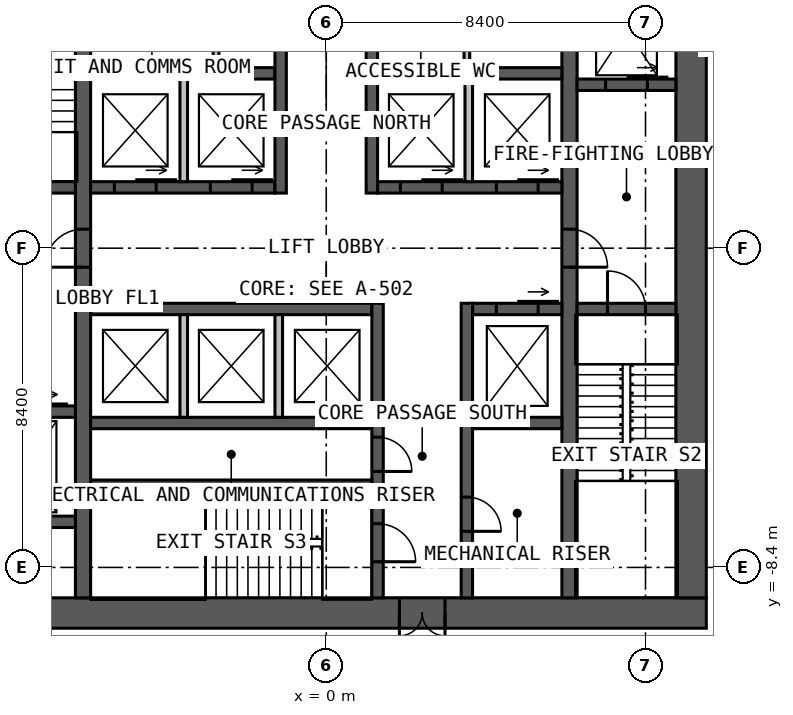
"""IFC4 building model, lengths in metres.
Left out: names, types, materials, properties, quantities, classifications, styles, units other than length and angle.
Written with IfcOpenShell. Run it as: python <this file> out.ifc"""

import sys

from ifc_helpers import new_model, si_unit, direction, frame, frame_2d, origin, place, context, subcontext, project, spatial, rectangle, extrude, element, fill, save


model = new_model("IFC4")
c1 = context("Model", 3, precision=1e-05, world=origin(), true_north=direction((0.0, 1.0)))
c2 = subcontext(c1, "Body", "Model", "MODEL_VIEW")
j1 = project(units=[si_unit("LENGTHUNIT", "METRE"), si_unit("PLANEANGLEUNIT", "RADIAN")], contexts=[c1])
p1 = place(None, origin())
s1 = spatial("IfcSite", under=j1, at=p1, CompositionType="ELEMENT")
p2 = place(p1, origin())
s2 = spatial("IfcBuilding", under=s1, at=p2, CompositionType="ELEMENT")
p3 = place(p2, frame((0.0, 0.0, 45.0)))
s3 = spatial("IfcBuildingStorey", under=s2, at=p3, CompositionType="ELEMENT", Elevation=45.0)
p4 = place(p3, frame((10.0, -9.6, 0.0), z_axis=(0.0, 0.0, 1.0), x_axis=(-1.0, 0.0, 0.0)))
e1 = element("IfcWall", 1, at=p4, inside=s3, PredefinedType="SOLIDWALL", context=c2, shape_type="SweptSolid", body=[
    extrude(rectangle(XDim=20.0, YDim=0.8, at=frame_2d((10.0, 0.0))), origin(), (0.0, 0.0, 1.0), 4.0),
])
p5 = place(p4, frame((6.875, 0.0, 0.0)))
e2 = element("IfcOpeningElement", 2, at=p5, cuts=e1, PredefinedType="OPENING", context=c2, shape_type="SweptSolid", body=[
    extrude(rectangle(XDim=1.2, YDim=2.2, at=frame_2d((0.6, 1.1))), frame((0.0, 0.41, 0.0), z_axis=(0.0, -1.0, 0.0), x_axis=(1.0, 0.0, 0.0)), (0.0, 0.0, 1.0), 0.82),
])
p6 = place(p3, frame((9.6, -9.2, 0.0), z_axis=(0.0, 0.0, 1.0), x_axis=(0.0, 1.0, 0.0)))
e3 = element("IfcWall", 3, at=p6, inside=s3, PredefinedType="SOLIDWALL", context=c2, shape_type="SweptSolid", body=[
    extrude(rectangle(XDim=18.4, YDim=0.8, at=frame_2d((9.2, 0.0))), origin(), (0.0, 0.0, 1.0), 4.0),
])
p7 = place(p3, frame((-6.4, -9.2, 0.0), z_axis=(0.0, 0.0, 1.0), x_axis=(0.0, 1.0, 0.0)))
e4 = element("IfcWall", 4, at=p7, inside=s3, PredefinedType="SOLIDWALL", context=c2, shape_type="SweptSolid", body=[
    extrude(rectangle(XDim=18.4, YDim=0.4, at=frame_2d((9.2, 0.0))), origin(), (0.0, 0.0, 1.0), 4.0),
])
p8 = place(p7, frame((8.7, 0.0, 0.0)))
e5 = element("IfcOpeningElement", 5, at=p8, cuts=e4, PredefinedType="OPENING", context=c2, shape_type="SweptSolid", body=[
    extrude(rectangle(XDim=1.0, YDim=2.2, at=frame_2d((0.5, 1.1))), frame((0.0, 0.21, 0.0), z_axis=(0.0, -1.0, 0.0), x_axis=(1.0, 0.0, 0.0)), (0.0, 0.0, 1.0), 0.42),
])
p9 = place(p3, frame((6.4, 9.2, 0.0), z_axis=(0.0, 0.0, 1.0), x_axis=(0.0, -1.0, 0.0)))
e6 = element("IfcWall", 6, at=p9, inside=s3, PredefinedType="SOLIDWALL", context=c2, shape_type="SweptSolid", body=[
    extrude(rectangle(XDim=18.4, YDim=0.4, at=frame_2d((9.2, 0.0))), origin(), (0.0, 0.0, 1.0), 4.0),
])
p10 = place(p9, frame((8.7, 0.0, 0.0)))
e7 = element("IfcOpeningElement", 7, at=p10, cuts=e6, PredefinedType="OPENING", context=c2, shape_type="SweptSolid", body=[
    extrude(rectangle(XDim=1.0, YDim=2.2, at=frame_2d((0.5, 1.1))), frame((0.0, 0.21, 0.0), z_axis=(0.0, -1.0, 0.0), x_axis=(1.0, 0.0, 0.0)), (0.0, 0.0, 1.0), 0.42),
])
p11 = place(p3, frame((-6.2, 1.6, 0.0), z_axis=(0.0, 0.0, 1.0), x_axis=(1.0, 0.0, 0.0)))
e8 = element("IfcWall", 8, at=p11, inside=s3, PredefinedType="SOLIDWALL", context=c2, shape_type="SweptSolid", body=[
    extrude(rectangle(XDim=4.85, YDim=0.3, at=frame_2d((2.425, 0.0))), origin(), (0.0, 0.0, 1.0), 4.0),
])
p12 = place(p11, frame((0.625, 0.0, 0.0)))
e9 = element("IfcOpeningElement", 9, at=p12, cuts=e8, PredefinedType="OPENING", context=c2, shape_type="SweptSolid", body=[
    extrude(rectangle(XDim=1.1, YDim=2.2, at=frame_2d((0.55, 1.1))), frame((0.0, 0.16, 0.0), z_axis=(0.0, -1.0, 0.0), x_axis=(1.0, 0.0, 0.0)), (0.0, 0.0, 1.0), 0.32),
])
p13 = place(p11, frame((3.15, 0.0, 0.0)))
e10 = element("IfcOpeningElement", 10, at=p13, cuts=e8, PredefinedType="OPENING", context=c2, shape_type="SweptSolid", body=[
    extrude(rectangle(XDim=1.1, YDim=2.2, at=frame_2d((0.55, 1.1))), frame((0.0, 0.16, 0.0), z_axis=(0.0, -1.0, 0.0), x_axis=(1.0, 0.0, 0.0)), (0.0, 0.0, 1.0), 0.32),
])
p14 = place(p3, frame((1.35, 1.6, 0.0), z_axis=(0.0, 0.0, 1.0), x_axis=(1.0, 0.0, 0.0)))
e11 = element("IfcWall", 11, at=p14, inside=s3, PredefinedType="SOLIDWALL", context=c2, shape_type="SweptSolid", body=[
    extrude(rectangle(XDim=4.85, YDim=0.3, at=frame_2d((2.425, 0.0))), origin(), (0.0, 0.0, 1.0), 4.0),
])
p15 = place(p14, frame((0.6, 0.0, 0.0)))
e12 = element("IfcOpeningElement", 12, at=p15, cuts=e11, PredefinedType="OPENING", context=c2, shape_type="SweptSolid", body=[
    extrude(rectangle(XDim=1.1, YDim=2.2, at=frame_2d((0.55, 1.1))), frame((0.0, 0.16, 0.0), z_axis=(0.0, -1.0, 0.0), x_axis=(1.0, 0.0, 0.0)), (0.0, 0.0, 1.0), 0.32),
])
p16 = place(p14, frame((3.125, 0.0, 0.0)))
e13 = element("IfcOpeningElement", 13, at=p16, cuts=e11, PredefinedType="OPENING", context=c2, shape_type="SweptSolid", body=[
    extrude(rectangle(XDim=1.1, YDim=2.2, at=frame_2d((0.55, 1.1))), frame((0.0, 0.16, 0.0), z_axis=(0.0, -1.0, 0.0), x_axis=(1.0, 0.0, 0.0)), (0.0, 0.0, 1.0), 0.32),
])
for number, where, z_axis, x_axis in (
    (14, (-6.2, 4.6, 0.0), (0.0, 0.0, 1.0), (1.0, 0.0, 0.0)),
    (15, (1.35, 4.6, 0.0), (0.0, 0.0, 1.0), (1.0, 0.0, 0.0)),
):
    element("IfcWall", number, at=place(p3, frame(where, z_axis=z_axis, x_axis=x_axis)), inside=s3, PredefinedType="SOLIDWALL", context=c2, shape_type="SweptSolid", body=[
        extrude(rectangle(XDim=4.85, YDim=0.3, at=frame_2d((2.425, 0.0))), origin(), (0.0, 0.0, 1.0), 4.0),
    ])
p17 = place(p3, frame((-1.2, 1.45, 0.0), z_axis=(0.0, 0.0, 1.0), x_axis=(0.0, 1.0, 0.0)))
e16 = element("IfcWall", 16, at=p17, inside=s3, PredefinedType="SOLIDWALL", context=c2, shape_type="SweptSolid", body=[
    extrude(rectangle(XDim=7.75, YDim=0.3, at=frame_2d((3.875, 0.0))), origin(), (0.0, 0.0, 1.0), 4.0),
])
p18 = place(p17, frame((5.05, 0.0, 0.0)))
e17 = element("IfcOpeningElement", 17, at=p18, cuts=e16, PredefinedType="OPENING", context=c2, shape_type="SweptSolid", body=[
    extrude(rectangle(XDim=1.0, YDim=2.2, at=frame_2d((0.5, 1.1))), frame((0.0, 0.16, 0.0), z_axis=(0.0, -1.0, 0.0), x_axis=(1.0, 0.0, 0.0)), (0.0, 0.0, 1.0), 0.32),
])
p19 = place(p3, frame((1.2, 1.45, 0.0), z_axis=(0.0, 0.0, 1.0), x_axis=(0.0, 1.0, 0.0)))
e18 = element("IfcWall", 18, at=p19, inside=s3, PredefinedType="SOLIDWALL", context=c2, shape_type="SweptSolid", body=[
    extrude(rectangle(XDim=7.75, YDim=0.3, at=frame_2d((3.875, 0.0))), origin(), (0.0, 0.0, 1.0), 4.0),
])
p20 = place(p19, frame((3.8, 0.0, 0.0)))
e19 = element("IfcOpeningElement", 19, at=p20, cuts=e18, PredefinedType="OPENING", context=c2, shape_type="SweptSolid", body=[
    extrude(rectangle(XDim=1.0, YDim=2.2, at=frame_2d((0.5, 1.1))), frame((0.0, 0.16, 0.0), z_axis=(0.0, -1.0, 0.0), x_axis=(1.0, 0.0, 0.0)), (0.0, 0.0, 1.0), 0.32),
])
p21 = place(p19, frame((6.15, 0.0, 0.0)))
e20 = element("IfcOpeningElement", 20, at=p21, cuts=e18, PredefinedType="OPENING", context=c2, shape_type="SweptSolid", body=[
    extrude(rectangle(XDim=1.0, YDim=2.2, at=frame_2d((0.5, 1.1))), frame((0.0, 0.16, 0.0), z_axis=(0.0, -1.0, 0.0), x_axis=(1.0, 0.0, 0.0)), (0.0, 0.0, 1.0), 0.32),
])
p22 = place(p3, frame((-6.2, -1.6, 0.0), z_axis=(0.0, 0.0, 1.0), x_axis=(1.0, 0.0, 0.0)))
e21 = element("IfcWall", 21, at=p22, inside=s3, PredefinedType="SOLIDWALL", context=c2, shape_type="SweptSolid", body=[
    extrude(rectangle(XDim=7.4, YDim=0.3, at=frame_2d((3.7, 0.0))), origin(), (0.0, 0.0, 1.0), 4.0),
])
p23 = place(p3, frame((3.85, -1.6, 0.0), z_axis=(0.0, 0.0, 1.0), x_axis=(1.0, 0.0, 0.0)))
e22 = element("IfcWall", 22, at=p23, inside=s3, PredefinedType="SOLIDWALL", context=c2, shape_type="SweptSolid", body=[
    extrude(rectangle(XDim=2.35, YDim=0.3, at=frame_2d((1.175, 0.0))), origin(), (0.0, 0.0, 1.0), 4.0),
])
p24 = place(p23, frame((0.625, 0.0, 0.0)))
e23 = element("IfcOpeningElement", 23, at=p24, cuts=e22, PredefinedType="OPENING", context=c2, shape_type="SweptSolid", body=[
    extrude(rectangle(XDim=1.1, YDim=2.2, at=frame_2d((0.55, 1.1))), frame((0.0, 0.16, 0.0), z_axis=(0.0, -1.0, 0.0), x_axis=(1.0, 0.0, 0.0)), (0.0, 0.0, 1.0), 0.32),
])
p25 = place(p3, frame((-6.2, -4.6, 0.0), z_axis=(0.0, 0.0, 1.0), x_axis=(1.0, 0.0, 0.0)))
e24 = element("IfcWall", 24, at=p25, inside=s3, PredefinedType="SOLIDWALL", context=c2, shape_type="SweptSolid", body=[
    extrude(rectangle(XDim=7.4, YDim=0.3, at=frame_2d((3.7, 0.0))), origin(), (0.0, 0.0, 1.0), 4.0),
])
p26 = place(p3, frame((3.85, -4.6, 0.0), z_axis=(0.0, 0.0, 1.0), x_axis=(1.0, 0.0, 0.0)))
e25 = element("IfcWall", 25, at=p26, inside=s3, PredefinedType="SOLIDWALL", context=c2, shape_type="SweptSolid", body=[
    extrude(rectangle(XDim=2.35, YDim=0.3, at=frame_2d((1.175, 0.0))), origin(), (0.0, 0.0, 1.0), 4.0),
])
p27 = place(p3, frame((1.35, -1.45, 0.0), z_axis=(0.0, 0.0, 1.0), x_axis=(0.0, -1.0, 0.0)))
e26 = element("IfcWall", 26, at=p27, inside=s3, PredefinedType="SOLIDWALL", context=c2, shape_type="SweptSolid", body=[
    extrude(rectangle(XDim=7.75, YDim=0.3, at=frame_2d((3.875, 0.0))), origin(), (0.0, 0.0, 1.0), 4.0),
])
p28 = place(p27, frame((5.8, 0.0, 0.0)))
e27 = element("IfcOpeningElement", 27, at=p28, cuts=e26, PredefinedType="OPENING", context=c2, shape_type="SweptSolid", body=[
    extrude(rectangle(XDim=1.0, YDim=2.2, at=frame_2d((0.5, 1.1))), frame((0.0, 0.16, 0.0), z_axis=(0.0, -1.0, 0.0), x_axis=(1.0, 0.0, 0.0)), (0.0, 0.0, 1.0), 0.32),
])
p29 = place(p27, frame((3.525, 0.0, 0.0)))
e28 = element("IfcOpeningElement", 28, at=p29, cuts=e26, PredefinedType="OPENING", context=c2, shape_type="SweptSolid", body=[
    extrude(rectangle(XDim=0.9, YDim=2.2, at=frame_2d((0.45, 1.1))), frame((0.0, 0.16, 0.0), z_axis=(0.0, -1.0, 0.0), x_axis=(1.0, 0.0, 0.0)), (0.0, 0.0, 1.0), 0.32),
])
p30 = place(p3, frame((3.7, -1.45, 0.0), z_axis=(0.0, 0.0, 1.0), x_axis=(0.0, -1.0, 0.0)))
e29 = element("IfcWall", 29, at=p30, inside=s3, PredefinedType="SOLIDWALL", context=c2, shape_type="SweptSolid", body=[
    extrude(rectangle(XDim=7.75, YDim=0.3, at=frame_2d((3.875, 0.0))), origin(), (0.0, 0.0, 1.0), 4.0),
])
p31 = place(p30, frame((5.1, 0.0, 0.0)))
e30 = element("IfcOpeningElement", 30, at=p31, cuts=e29, PredefinedType="OPENING", context=c2, shape_type="SweptSolid", body=[
    extrude(rectangle(XDim=0.9, YDim=2.2, at=frame_2d((0.45, 1.1))), frame((0.0, 0.16, 0.0), z_axis=(0.0, -1.0, 0.0), x_axis=(1.0, 0.0, 0.0)), (0.0, 0.0, 1.0), 0.32),
])
p32 = place(p3, frame((-6.2, -6.2, 0.0), z_axis=(0.0, 0.0, 1.0), x_axis=(1.0, 0.0, 0.0)))
e31 = element("IfcWall", 31, at=p32, inside=s3, PredefinedType="SOLIDWALL", context=c2, shape_type="SweptSolid", body=[
    extrude(rectangle(XDim=7.4, YDim=0.2, at=frame_2d((3.7, 0.0))), origin(), (0.0, 0.0, 1.0), 4.0),
])
p33 = place(p3, frame((-9.2, 1.6, 0.0), z_axis=(0.0, 0.0, 1.0), x_axis=(1.0, 0.0, 0.0)))
e32 = element("IfcWall", 32, at=p33, inside=s3, PredefinedType="SOLIDWALL", context=c2, shape_type="SweptSolid", body=[
    extrude(rectangle(XDim=2.6, YDim=0.3, at=frame_2d((1.3, 0.0))), origin(), (0.0, 0.0, 1.0), 4.0),
])
p34 = place(p33, frame((0.8, 0.0, 0.0)))
e33 = element("IfcOpeningElement", 33, at=p34, cuts=e32, PredefinedType="OPENING", context=c2, shape_type="SweptSolid", body=[
    extrude(rectangle(XDim=1.0, YDim=2.2, at=frame_2d((0.5, 1.1))), frame((0.0, 0.16, 0.0), z_axis=(0.0, -1.0, 0.0), x_axis=(1.0, 0.0, 0.0)), (0.0, 0.0, 1.0), 0.32),
])
p35 = place(p3, frame((6.6, -1.6, 0.0), z_axis=(0.0, 0.0, 1.0), x_axis=(1.0, 0.0, 0.0)))
e34 = element("IfcWall", 34, at=p35, inside=s3, PredefinedType="SOLIDWALL", context=c2, shape_type="SweptSolid", body=[
    extrude(rectangle(XDim=2.6, YDim=0.3, at=frame_2d((1.3, 0.0))), origin(), (0.0, 0.0, 1.0), 4.0),
])
p36 = place(p35, frame((0.8, 0.0, 0.0)))
e35 = element("IfcOpeningElement", 35, at=p36, cuts=e34, PredefinedType="OPENING", context=c2, shape_type="SweptSolid", body=[
    extrude(rectangle(XDim=1.0, YDim=2.2, at=frame_2d((0.5, 1.1))), frame((0.0, 0.16, 0.0), z_axis=(0.0, -1.0, 0.0), x_axis=(1.0, 0.0, 0.0)), (0.0, 0.0, 1.0), 0.32),
])
p37 = place(p3, frame((-9.2, -4.3, 0.0), z_axis=(0.0, 0.0, 1.0), x_axis=(1.0, 0.0, 0.0)))
e36 = element("IfcWall", 36, at=p37, inside=s3, PredefinedType="SOLIDWALL", context=c2, shape_type="SweptSolid", body=[
    extrude(rectangle(XDim=2.6, YDim=0.3, at=frame_2d((1.3, 0.0))), origin(), (0.0, 0.0, 1.0), 4.0),
])
p38 = place(p37, frame((0.75, 0.0, 0.0)))
e37 = element("IfcOpeningElement", 37, at=p38, cuts=e36, PredefinedType="OPENING", context=c2, shape_type="SweptSolid", body=[
    extrude(rectangle(XDim=1.1, YDim=2.2, at=frame_2d((0.55, 1.1))), frame((0.0, 0.16, 0.0), z_axis=(0.0, -1.0, 0.0), x_axis=(1.0, 0.0, 0.0)), (0.0, 0.0, 1.0), 0.32),
])
p39 = place(p3, frame((6.6, 4.3, 0.0), z_axis=(0.0, 0.0, 1.0), x_axis=(1.0, 0.0, 0.0)))
e38 = element("IfcWall", 38, at=p39, inside=s3, PredefinedType="SOLIDWALL", context=c2, shape_type="SweptSolid", body=[
    extrude(rectangle(XDim=2.6, YDim=0.3, at=frame_2d((1.3, 0.0))), origin(), (0.0, 0.0, 1.0), 4.0),
])
p40 = place(p39, frame((0.75, 0.0, 0.0)))
e39 = element("IfcOpeningElement", 39, at=p40, cuts=e38, PredefinedType="OPENING", context=c2, shape_type="SweptSolid", body=[
    extrude(rectangle(XDim=1.1, YDim=2.2, at=frame_2d((0.55, 1.1))), frame((0.0, 0.16, 0.0), z_axis=(0.0, -1.0, 0.0), x_axis=(1.0, 0.0, 0.0)), (0.0, 0.0, 1.0), 0.32),
])
p41 = place(p3, frame((-9.2, -7.2, 0.0), z_axis=(0.0, 0.0, 1.0), x_axis=(1.0, 0.0, 0.0)))
e40 = element("IfcWall", 40, at=p41, inside=s3, PredefinedType="SOLIDWALL", context=c2, shape_type="SweptSolid", body=[
    extrude(rectangle(XDim=2.6, YDim=0.3, at=frame_2d((1.3, 0.0))), origin(), (0.0, 0.0, 1.0), 4.0),
])
for number, where, z_axis, x_axis in (
    (41, (-3.75, 1.75, 0.0), (0.0, 0.0, 1.0), (0.0, 1.0, 0.0)),
    (42, (3.75, 1.75, 0.0), (0.0, 0.0, 1.0), (0.0, 1.0, 0.0)),
    (43, (-3.75, -1.75, 0.0), (0.0, 0.0, 1.0), (0.0, -1.0, 0.0)),
    (44, (-1.25, -1.75, 0.0), (0.0, 0.0, 1.0), (0.0, -1.0, 0.0)),
):
    element("IfcWall", number, at=place(p3, frame(where, z_axis=z_axis, x_axis=x_axis)), inside=s3, PredefinedType="SOLIDWALL", context=c2, shape_type="SweptSolid", body=[
        extrude(rectangle(XDim=2.7, YDim=0.2, at=frame_2d((1.35, 0.0))), origin(), (0.0, 0.0, 1.0), 3.75),
    ])
p42 = place(p3, frame((3.7, 4.75, 0.0), z_axis=(0.0, 0.0, 1.0), x_axis=(0.0, 1.0, 0.0)))
e45 = element("IfcWall", 45, at=p42, inside=s3, PredefinedType="PARTITIONING", context=c2, shape_type="SweptSolid", body=[
    extrude(rectangle(XDim=1.975, YDim=0.15, at=frame_2d((0.988, 0.0))), origin(), (0.0, 0.0, 1.0), 3.75),
])
p43 = place(p3, frame((-2.9, 4.75, 0.0), z_axis=(0.0, 0.0, 1.0), x_axis=(0.0, 1.0, 0.0)))
e46 = element("IfcWall", 46, at=p43, inside=s3, PredefinedType="PARTITIONING", context=c2, shape_type="SweptSolid", body=[
    extrude(rectangle(XDim=4.45, YDim=0.15, at=frame_2d((2.225, 0.0))), origin(), (0.0, 0.0, 1.0), 3.75),
])
p44 = place(p43, frame((2.95, 0.0, 0.0)))
e47 = element("IfcOpeningElement", 47, at=p44, cuts=e46, PredefinedType="OPENING", context=c2, shape_type="SweptSolid", body=[
    extrude(rectangle(XDim=1.0, YDim=2.2, at=frame_2d((0.5, 1.1))), frame((0.0, 0.085, 0.0), z_axis=(0.0, -1.0, 0.0), x_axis=(1.0, 0.0, 0.0)), (0.0, 0.0, 1.0), 0.17),
])
p45 = place(p43, frame((0.6, 0.0, 0.0)))
e48 = element("IfcOpeningElement", 48, at=p45, cuts=e46, PredefinedType="OPENING", context=c2, shape_type="SweptSolid", body=[
    extrude(rectangle(XDim=0.9, YDim=2.2, at=frame_2d((0.45, 1.1))), frame((0.0, 0.085, 0.0), z_axis=(0.0, -1.0, 0.0), x_axis=(1.0, 0.0, 0.0)), (0.0, 0.0, 1.0), 0.17),
])
p46 = place(p5, origin())
e49 = element("IfcDoor", 49, at=p46, inside=s3, OperationType="DOUBLE_DOOR_SINGLE_SWING", PredefinedType="DOOR", context=c2, shape_type="SweptSolid", body=[
    extrude(rectangle(XDim=1.2, YDim=2.2, at=frame_2d((0.6, 1.1))), frame((0.0, 0.025, 0.0), z_axis=(0.0, -1.0, 0.0), x_axis=(1.0, 0.0, 0.0)), (0.0, 0.0, 1.0), 0.05),
])
fill(e2, e49)
p47 = place(p8, origin())
e50 = element("IfcDoor", 50, at=p47, inside=s3, OperationType="SINGLE_SWING_LEFT", PredefinedType="DOOR", context=c2, shape_type="SweptSolid", body=[
    extrude(rectangle(XDim=1.0, YDim=2.2, at=frame_2d((0.5, 1.1))), frame((0.0, 0.025, 0.0), z_axis=(0.0, -1.0, 0.0), x_axis=(1.0, 0.0, 0.0)), (0.0, 0.0, 1.0), 0.05),
])
fill(e5, e50)
p48 = place(p10, origin())
e51 = element("IfcDoor", 51, at=p48, inside=s3, OperationType="SINGLE_SWING_RIGHT", PredefinedType="DOOR", context=c2, shape_type="SweptSolid", body=[
    extrude(rectangle(XDim=1.0, YDim=2.2, at=frame_2d((0.5, 1.1))), frame((0.0, 0.025, 0.0), z_axis=(0.0, -1.0, 0.0), x_axis=(1.0, 0.0, 0.0)), (0.0, 0.0, 1.0), 0.05),
])
fill(e7, e51)
p49 = place(p36, origin())
e52 = element("IfcDoor", 52, at=p49, inside=s3, OperationType="SINGLE_SWING_LEFT", PredefinedType="DOOR", context=c2, shape_type="SweptSolid", body=[
    extrude(rectangle(XDim=1.0, YDim=2.2, at=frame_2d((0.5, 1.1))), frame((0.0, 0.025, 0.0), z_axis=(0.0, -1.0, 0.0), x_axis=(1.0, 0.0, 0.0)), (0.0, 0.0, 1.0), 0.05),
])
fill(e35, e52)
p50 = place(p28, origin())
e53 = element("IfcDoor", 53, at=p50, inside=s3, OperationType="SINGLE_SWING_RIGHT", PredefinedType="DOOR", context=c2, shape_type="SweptSolid", body=[
    extrude(rectangle(XDim=1.0, YDim=2.2, at=frame_2d((0.5, 1.1))), frame((0.0, 0.025, 0.0), z_axis=(0.0, -1.0, 0.0), x_axis=(1.0, 0.0, 0.0)), (0.0, 0.0, 1.0), 0.05),
])
fill(e27, e53)
p51 = place(p29, origin())
e54 = element("IfcDoor", 54, at=p51, inside=s3, OperationType="SINGLE_SWING_RIGHT", PredefinedType="DOOR", context=c2, shape_type="SweptSolid", body=[
    extrude(rectangle(XDim=0.9, YDim=2.2, at=frame_2d((0.45, 1.1))), frame((0.0, 0.025, 0.0), z_axis=(0.0, -1.0, 0.0), x_axis=(1.0, 0.0, 0.0)), (0.0, 0.0, 1.0), 0.05),
])
fill(e28, e54)
p52 = place(p31, origin())
e55 = element("IfcDoor", 55, at=p52, inside=s3, OperationType="SINGLE_SWING_RIGHT", PredefinedType="DOOR", context=c2, shape_type="SweptSolid", body=[
    extrude(rectangle(XDim=0.9, YDim=2.2, at=frame_2d((0.45, 1.1))), frame((0.0, 0.025, 0.0), z_axis=(0.0, -1.0, 0.0), x_axis=(1.0, 0.0, 0.0)), (0.0, 0.0, 1.0), 0.05),
])
fill(e30, e55)
p53 = place(p12, origin())
e56 = element("IfcDoor", 56, at=p53, inside=s3, OperationType="SLIDING_TO_LEFT", PredefinedType="DOOR", context=c2, shape_type="SweptSolid", body=[
    extrude(rectangle(XDim=1.1, YDim=2.2, at=frame_2d((0.55, 1.1))), frame((0.0, 0.025, 0.0), z_axis=(0.0, -1.0, 0.0), x_axis=(1.0, 0.0, 0.0)), (0.0, 0.0, 1.0), 0.05),
])
fill(e9, e56)
p54 = place(p13, origin())
e57 = element("IfcDoor", 57, at=p54, inside=s3, OperationType="SLIDING_TO_LEFT", PredefinedType="DOOR", context=c2, shape_type="SweptSolid", body=[
    extrude(rectangle(XDim=1.1, YDim=2.2, at=frame_2d((0.55, 1.1))), frame((0.0, 0.025, 0.0), z_axis=(0.0, -1.0, 0.0), x_axis=(1.0, 0.0, 0.0)), (0.0, 0.0, 1.0), 0.05),
])
fill(e10, e57)
p55 = place(p15, origin())
e58 = element("IfcDoor", 58, at=p55, inside=s3, OperationType="SLIDING_TO_LEFT", PredefinedType="DOOR", context=c2, shape_type="SweptSolid", body=[
    extrude(rectangle(XDim=1.1, YDim=2.2, at=frame_2d((0.55, 1.1))), frame((0.0, 0.025, 0.0), z_axis=(0.0, -1.0, 0.0), x_axis=(1.0, 0.0, 0.0)), (0.0, 0.0, 1.0), 0.05),
])
fill(e12, e58)
p56 = place(p16, origin())
e59 = element("IfcDoor", 59, at=p56, inside=s3, OperationType="SLIDING_TO_LEFT", PredefinedType="DOOR", context=c2, shape_type="SweptSolid", body=[
    extrude(rectangle(XDim=1.1, YDim=2.2, at=frame_2d((0.55, 1.1))), frame((0.0, 0.025, 0.0), z_axis=(0.0, -1.0, 0.0), x_axis=(1.0, 0.0, 0.0)), (0.0, 0.0, 1.0), 0.05),
])
fill(e13, e59)
p57 = place(p24, origin())
e60 = element("IfcDoor", 60, at=p57, inside=s3, OperationType="SLIDING_TO_LEFT", PredefinedType="DOOR", context=c2, shape_type="SweptSolid", body=[
    extrude(rectangle(XDim=1.1, YDim=2.2, at=frame_2d((0.55, 1.1))), frame((0.0, 0.025, 0.0), z_axis=(0.0, -1.0, 0.0), x_axis=(1.0, 0.0, 0.0)), (0.0, 0.0, 1.0), 0.05),
])
fill(e23, e60)
p58 = place(p40, origin())
e61 = element("IfcDoor", 61, at=p58, inside=s3, OperationType="SLIDING_TO_LEFT", PredefinedType="DOOR", context=c2, shape_type="SweptSolid", body=[
    extrude(rectangle(XDim=1.1, YDim=2.2, at=frame_2d((0.55, 1.1))), frame((0.0, 0.025, 0.0), z_axis=(0.0, -1.0, 0.0), x_axis=(1.0, 0.0, 0.0)), (0.0, 0.0, 1.0), 0.05),
])
fill(e39, e61)
save(model, sys.argv[1])
